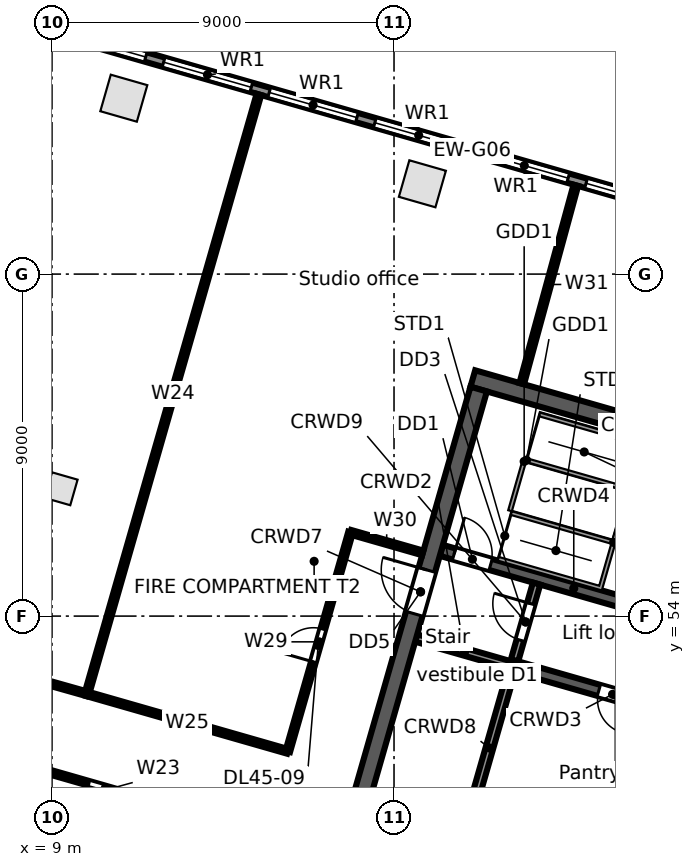
"""IFC4 building model, lengths in metres.
Left out: names, types, materials, properties, quantities, classifications, styles, units other than length and angle.
Written with IfcOpenShell. Run it as: python <this file> out.ifc"""

import sys

from ifc_helpers import new_model, si_unit, direction, frame, frame_2d, origin, origin_2d, place, context, subcontext, project, spatial, rectangle, extrude, element, fill, save


model = new_model("IFC4")
c1 = context("Model", 3, precision=1e-05, world=origin(), true_north=direction((0.0, 1.0)))
c2 = subcontext(c1, "Body", "Model", "MODEL_VIEW")
j1 = project(units=[si_unit("LENGTHUNIT", "METRE"), si_unit("PLANEANGLEUNIT", "RADIAN")], contexts=[c1])
p1 = place(None, origin())
s1 = spatial("IfcSite", under=j1, at=p1, CompositionType="ELEMENT")
p2 = place(p1, origin())
s2 = spatial("IfcBuilding", under=s1, at=p2, CompositionType="ELEMENT")
p3 = place(p2, frame((0.0, 0.0, 211.4)))
s3 = spatial("IfcBuildingStorey", under=s2, at=p3, CompositionType="ELEMENT", Elevation=211.4)
for number, where, z_axis, x_axis in (
    (1, (18.746, 65.376, 0.0), (0.0, 0.0, 1.0), (-0.961, 0.276, 0.0)),
    (2, (10.89, 67.629, 0.0), (0.0, 0.0, 1.0), (-0.961, 0.276, 0.0)),
):
    element("IfcColumn", number, at=place(p3, frame(where, z_axis=z_axis, x_axis=x_axis)), inside=s3, PredefinedType="COLUMN", context=c2, shape_type="SweptSolid", body=[
        extrude(rectangle(XDim=1.0, YDim=1.0, at=origin_2d()), origin(), (0.0, 0.0, 1.0), 3.9),
    ])
p4 = place(p3, frame((9.241, 57.35, 0.0), z_axis=(0.0, 0.0, 1.0), x_axis=(0.961261695938, -0.275637355817, 0.0)))
e3 = element("IfcColumn", 3, at=p4, inside=s3, PredefinedType="COLUMN", context=c2, shape_type="SweptSolid", body=[
    extrude(rectangle(XDim=0.7, YDim=0.7, at=origin_2d()), origin(), (0.0, 0.0, 1.0), 3.9),
])
p5 = place(p3, frame((3.34, 71.042, 0.0), z_axis=(0.0, 0.0, 1.0), x_axis=(0.96126179431, -0.275637012753, 0.0)))
e4 = element("IfcWall", 4, at=p5, inside=s3, PredefinedType="STANDARD", context=c2, shape_type="SweptSolid", body=[
    extrude(rectangle(XDim=34.779, YDim=0.25, at=frame_2d((17.39, 0.0))), origin(), (0.0, 0.0, 1.0), 3.62),
])
p6 = place(p5, frame((32.071, 0.0, 0.8)))
e5 = element("IfcOpeningElement", 5, at=p6, cuts=e4, PredefinedType="OPENING", context=c2, shape_type="SweptSolid", body=[
    extrude(rectangle(XDim=2.4, YDim=2.2, at=frame_2d((1.2, 1.1))), frame((0.0, 0.135, 0.0), z_axis=(0.0, -1.0, 0.0), x_axis=(1.0, 0.0, 0.0)), (0.0, 0.0, 1.0), 0.27),
])
p7 = place(p5, frame((29.18, 0.0, 0.8)))
e6 = element("IfcOpeningElement", 6, at=p7, cuts=e4, PredefinedType="OPENING", context=c2, shape_type="SweptSolid", body=[
    extrude(rectangle(XDim=2.4, YDim=2.2, at=frame_2d((1.2, 1.1))), frame((0.0, 0.135, 0.0), z_axis=(0.0, -1.0, 0.0), x_axis=(1.0, 0.0, 0.0)), (0.0, 0.0, 1.0), 0.27),
])
p8 = place(p5, frame((26.289, 0.0, 0.8)))
e7 = element("IfcOpeningElement", 7, at=p8, cuts=e4, PredefinedType="OPENING", context=c2, shape_type="SweptSolid", body=[
    extrude(rectangle(XDim=2.4, YDim=2.2, at=frame_2d((1.2, 1.1))), frame((0.0, 0.135, 0.0), z_axis=(0.0, -1.0, 0.0), x_axis=(1.0, 0.0, 0.0)), (0.0, 0.0, 1.0), 0.27),
])
p9 = place(p5, frame((23.398, 0.0, 0.8)))
e8 = element("IfcOpeningElement", 8, at=p9, cuts=e4, PredefinedType="OPENING", context=c2, shape_type="SweptSolid", body=[
    extrude(rectangle(XDim=2.4, YDim=2.2, at=frame_2d((1.2, 1.1))), frame((0.0, 0.135, 0.0), z_axis=(0.0, -1.0, 0.0), x_axis=(1.0, 0.0, 0.0)), (0.0, 0.0, 1.0), 0.27),
])
p10 = place(p5, frame((20.508, 0.0, 0.8)))
e9 = element("IfcOpeningElement", 9, at=p10, cuts=e4, PredefinedType="OPENING", context=c2, shape_type="SweptSolid", body=[
    extrude(rectangle(XDim=2.4, YDim=2.2, at=frame_2d((1.2, 1.1))), frame((0.0, 0.135, 0.0), z_axis=(0.0, -1.0, 0.0), x_axis=(1.0, 0.0, 0.0)), (0.0, 0.0, 1.0), 0.27),
])
p11 = place(p5, frame((17.616, 0.0, 0.8)))
e10 = element("IfcOpeningElement", 10, at=p11, cuts=e4, PredefinedType="OPENING", context=c2, shape_type="SweptSolid", body=[
    extrude(rectangle(XDim=2.4, YDim=2.2, at=frame_2d((1.2, 1.1))), frame((0.0, 0.135, 0.0), z_axis=(0.0, -1.0, 0.0), x_axis=(1.0, 0.0, 0.0)), (0.0, 0.0, 1.0), 0.27),
])
p12 = place(p5, frame((14.726, 0.0, 0.8)))
e11 = element("IfcOpeningElement", 11, at=p12, cuts=e4, PredefinedType="OPENING", context=c2, shape_type="SweptSolid", body=[
    extrude(rectangle(XDim=2.4, YDim=2.2, at=frame_2d((1.2, 1.1))), frame((0.0, 0.135, 0.0), z_axis=(0.0, -1.0, 0.0), x_axis=(1.0, 0.0, 0.0)), (0.0, 0.0, 1.0), 0.27),
])
p13 = place(p5, frame((11.834, 0.0, 0.8)))
e12 = element("IfcOpeningElement", 12, at=p13, cuts=e4, PredefinedType="OPENING", context=c2, shape_type="SweptSolid", body=[
    extrude(rectangle(XDim=2.4, YDim=2.2, at=frame_2d((1.2, 1.1))), frame((0.0, 0.135, 0.0), z_axis=(0.0, -1.0, 0.0), x_axis=(1.0, 0.0, 0.0)), (0.0, 0.0, 1.0), 0.27),
])
p14 = place(p5, frame((8.944, 0.0, 0.8)))
e13 = element("IfcOpeningElement", 13, at=p14, cuts=e4, PredefinedType="OPENING", context=c2, shape_type="SweptSolid", body=[
    extrude(rectangle(XDim=2.4, YDim=2.2, at=frame_2d((1.2, 1.1))), frame((0.0, 0.135, 0.0), z_axis=(0.0, -1.0, 0.0), x_axis=(1.0, 0.0, 0.0)), (0.0, 0.0, 1.0), 0.27),
])
p15 = place(p5, frame((6.052, 0.0, 0.8)))
e14 = element("IfcOpeningElement", 14, at=p15, cuts=e4, PredefinedType="OPENING", context=c2, shape_type="SweptSolid", body=[
    extrude(rectangle(XDim=2.4, YDim=2.2, at=frame_2d((1.2, 1.1))), frame((0.0, 0.135, 0.0), z_axis=(0.0, -1.0, 0.0), x_axis=(1.0, 0.0, 0.0)), (0.0, 0.0, 1.0), 0.27),
])
p16 = place(p5, frame((3.162, 0.0, 0.8)))
e15 = element("IfcOpeningElement", 15, at=p16, cuts=e4, PredefinedType="OPENING", context=c2, shape_type="SweptSolid", body=[
    extrude(rectangle(XDim=2.4, YDim=2.2, at=frame_2d((1.2, 1.1))), frame((0.0, 0.135, 0.0), z_axis=(0.0, -1.0, 0.0), x_axis=(1.0, 0.0, 0.0)), (0.0, 0.0, 1.0), 0.27),
])
p17 = place(p5, frame((0.271, 0.0, 0.8)))
e16 = element("IfcOpeningElement", 16, at=p17, cuts=e4, PredefinedType="OPENING", context=c2, shape_type="SweptSolid", body=[
    extrude(rectangle(XDim=2.4, YDim=2.2, at=frame_2d((1.2, 1.1))), frame((0.0, 0.135, 0.0), z_axis=(0.0, -1.0, 0.0), x_axis=(1.0, 0.0, 0.0)), (0.0, 0.0, 1.0), 0.27),
])
p18 = place(p3, frame((18.583, 53.423, 0.0), z_axis=(0.0, 0.0, 1.0), x_axis=(0.961259287968, -0.275645753268, 0.0)))
e17 = element("IfcWall", 17, at=p18, inside=s3, PredefinedType="SOLIDWALL", context=c2, shape_type="SweptSolid", body=[
    extrude(rectangle(XDim=2.65, YDim=0.2, at=frame_2d((1.325, 0.0))), origin(), (0.0, 0.0, 1.0), 3.62),
])
p19 = place(p3, frame((21.131, 52.692, 0.0), z_axis=(0.0, 0.0, 1.0), x_axis=(0.961261488075, -0.275638080722, 0.0)))
e18 = element("IfcWall", 18, at=p19, inside=s3, PredefinedType="SOLIDWALL", context=c2, shape_type="SweptSolid", body=[
    extrude(rectangle(XDim=5.45, YDim=0.3, at=frame_2d((2.725, 0.0))), origin(), (0.0, 0.0, 1.0), 3.62),
])
p20 = place(p19, frame((2.35, 0.0, 0.0)))
e19 = element("IfcOpeningElement", 19, at=p20, cuts=e18, PredefinedType="OPENING", context=c2, shape_type="SweptSolid", body=[
    extrude(rectangle(XDim=0.9, YDim=2.1, at=frame_2d((0.45, 1.05))), frame((0.0, 0.16, 0.0), z_axis=(0.0, -1.0, 0.0), x_axis=(1.0, 0.0, 0.0)), (0.0, 0.0, 1.0), 0.32),
])
p21 = place(p3, frame((19.245, 55.73, 0.0), z_axis=(0.0, 0.0, 1.0), x_axis=(0.961263007877, -0.275632780503, 0.0)))
e20 = element("IfcWall", 20, at=p21, inside=s3, PredefinedType="SOLIDWALL", context=c2, shape_type="SweptSolid", body=[
    extrude(rectangle(XDim=7.25, YDim=0.3, at=frame_2d((3.625, 0.0))), origin(), (0.0, 0.0, 1.0), 3.62),
])
p22 = place(p21, frame((0.35, 0.0, 0.0)))
e21 = element("IfcOpeningElement", 21, at=p22, cuts=e20, PredefinedType="OPENING", context=c2, shape_type="SweptSolid", body=[
    extrude(rectangle(XDim=1.0, YDim=2.1, at=frame_2d((0.5, 1.05))), frame((0.0, 0.16, 0.0), z_axis=(0.0, -1.0, 0.0), x_axis=(1.0, 0.0, 0.0)), (0.0, 0.0, 1.0), 0.32),
])
p23 = place(p3, frame((20.073, 60.252, 0.0), z_axis=(0.0, 0.0, 1.0), x_axis=(0.96126248289, -0.275634611374, 0.0)))
e22 = element("IfcWall", 22, at=p23, inside=s3, PredefinedType="SOLIDWALL", context=c2, shape_type="SweptSolid", body=[
    extrude(rectangle(XDim=9.0, YDim=0.45, at=frame_2d((4.5, 0.0))), origin(), (0.0, 0.0, 1.0), 3.62),
])
p24 = place(p3, frame((17.168, 49.303, 0.0), z_axis=(0.0, 0.0, 1.0), x_axis=(0.275638974822, 0.961261231695, 0.0)))
e23 = element("IfcWall", 23, at=p24, inside=s3, PredefinedType="SOLIDWALL", context=c2, shape_type="SweptSolid", body=[
    extrude(rectangle(XDim=11.1, YDim=0.45, at=frame_2d((5.55, 0.0))), origin(), (0.0, 0.0, 1.0), 3.62),
])
p25 = place(p24, frame((4.95, 0.0, 0.0)))
e24 = element("IfcOpeningElement", 24, at=p25, cuts=e23, PredefinedType="OPENING", context=c2, shape_type="SweptSolid", body=[
    extrude(rectangle(XDim=1.2, YDim=2.1, at=frame_2d((0.6, 1.05))), frame((0.0, 0.235, 0.0), z_axis=(0.0, -1.0, 0.0), x_axis=(1.0, 0.0, 0.0)), (0.0, 0.0, 1.0), 0.47),
])
p26 = place(p3, frame((19.932, 48.511, 0.0), z_axis=(0.0, 0.0, 1.0), x_axis=(0.275642273411, 0.961260285827, 0.0)))
e25 = element("IfcWall", 25, at=p26, inside=s3, PredefinedType="SOLIDWALL", context=c2, shape_type="SweptSolid", body=[
    extrude(rectangle(XDim=4.2, YDim=0.2, at=frame_2d((2.1, 0.0))), origin(), (0.0, 0.0, 1.0), 3.62),
])
p27 = place(p3, frame((21.172, 52.837, 0.0), z_axis=(0.0, 0.0, 1.0), x_axis=(0.275657676022, 0.961255868981, 0.0)))
e26 = element("IfcWall", 26, at=p27, inside=s3, PredefinedType="PARTITIONING", context=c2, shape_type="SweptSolid", body=[
    extrude(rectangle(XDim=2.1, YDim=0.2, at=frame_2d((1.05, 0.0))), origin(), (0.0, 0.0, 1.0), 3.62),
])
p28 = place(p27, frame((0.55, 0.0, 0.0)))
e27 = element("IfcOpeningElement", 27, at=p28, cuts=e26, PredefinedType="OPENING", context=c2, shape_type="SweptSolid", body=[
    extrude(rectangle(XDim=1.0, YDim=2.1, at=frame_2d((0.5, 1.05))), frame((0.0, 0.11, 0.0), z_axis=(0.0, -1.0, 0.0), x_axis=(1.0, 0.0, 0.0)), (0.0, 0.0, 1.0), 0.22),
])
p29 = place(p3, frame((0.0, 54.75, 0.0), z_axis=(0.0, 0.0, 1.0), x_axis=(0.962504897093, -0.271264304823, 0.0)))
e28 = element("IfcWall", 28, at=p29, inside=s3, PredefinedType="PARTITIONING", context=c2, shape_type="SweptSolid", body=[
    extrude(rectangle(XDim=10.303, YDim=0.125, at=frame_2d((5.152, 0.0))), origin(), (0.0, 0.0, 1.0), 2.9),
])
p30 = place(p29, frame((4.7, 0.0, 0.0)))
e29 = element("IfcOpeningElement", 29, at=p30, cuts=e28, PredefinedType="OPENING", context=c2, shape_type="SweptSolid", body=[
    extrude(rectangle(XDim=0.9, YDim=2.1, at=frame_2d((0.45, 1.05))), frame((0.0, 0.073, 0.0), z_axis=(0.0, -1.0, 0.0), x_axis=(1.0, 0.0, 0.0)), (0.0, 0.0, 1.0), 0.145),
])
p31 = place(p3, frame((6.413, 50.619, 0.0), z_axis=(0.0, 0.0, 1.0), x_axis=(0.961251402136, -0.275673252041, 0.0)))
e30 = element("IfcWall", 30, at=p31, inside=s3, PredefinedType="PARTITIONING", context=c2, shape_type="SweptSolid", body=[
    extrude(rectangle(XDim=8.499, YDim=0.125, at=frame_2d((4.25, 0.0))), origin(), (0.0, 0.0, 1.0), 2.8),
])
p32 = place(p31, frame((3.7, 0.0, 0.0)))
e31 = element("IfcOpeningElement", 31, at=p32, cuts=e30, PredefinedType="OPENING", context=c2, shape_type="SweptSolid", body=[
    extrude(rectangle(XDim=0.9, YDim=2.1, at=frame_2d((0.45, 1.05))), frame((0.0, 0.073, 0.0), z_axis=(0.0, -1.0, 0.0), x_axis=(1.0, 0.0, 0.0)), (0.0, 0.0, 1.0), 0.145),
])
p33 = place(p3, frame((9.917, 51.955, 0.0), z_axis=(0.0, 0.0, 1.0), x_axis=(0.275933286704, 0.96117678982, 0.0)))
e32 = element("IfcWall", 32, at=p33, inside=s3, PredefinedType="PARTITIONING", context=c2, shape_type="SweptSolid", body=[
    extrude(rectangle(XDim=16.41, YDim=0.125, at=frame_2d((8.205, 0.0))), origin(), (0.0, 0.0, 1.0), 2.792),
])
p34 = place(p3, frame((9.917, 51.955, 0.0), z_axis=(0.0, 0.0, 1.0), x_axis=(0.961258850611, -0.275647278458, 0.0)))
e33 = element("IfcWall", 33, at=p34, inside=s3, PredefinedType="PARTITIONING", context=c2, shape_type="SweptSolid", body=[
    extrude(rectangle(XDim=5.5, YDim=0.125, at=frame_2d((2.75, 0.0))), origin(), (0.0, 0.0, 1.0), 2.8),
])
p35 = place(p3, frame((15.204, 50.439, 0.0), z_axis=(0.0, 0.0, 1.0), x_axis=(0.275505760599, 0.961299420512, 0.0)))
e34 = element("IfcWall", 34, at=p35, inside=s3, PredefinedType="PARTITIONING", context=c2, shape_type="SweptSolid", body=[
    extrude(rectangle(XDim=5.999, YDim=0.125, at=frame_2d((3.0, 0.0))), origin(), (0.0, 0.0, 1.0), 2.8),
])
p36 = place(p35, frame((2.45, 0.0, 0.0)))
e35 = element("IfcOpeningElement", 35, at=p36, cuts=e34, PredefinedType="OPENING", context=c2, shape_type="SweptSolid", body=[
    extrude(rectangle(XDim=0.9, YDim=2.1, at=frame_2d((0.45, 1.05))), frame((0.0, 0.073, 0.0), z_axis=(0.0, -1.0, 0.0), x_axis=(1.0, 0.0, 0.0)), (0.0, 0.0, 1.0), 0.145),
])
p37 = place(p3, frame((16.857, 56.206, 0.0), z_axis=(0.0, 0.0, 1.0), x_axis=(0.961383985066, -0.275210525341, 0.0)))
e36 = element("IfcWall", 36, at=p37, inside=s3, PredefinedType="PARTITIONING", context=c2, shape_type="SweptSolid", body=[
    extrude(rectangle(XDim=1.977, YDim=0.125, at=frame_2d((0.988, 0.0))), origin(), (0.0, 0.0, 1.0), 3.62),
])
p38 = place(p3, frame((21.36, 60.117, 0.0), z_axis=(0.0, 0.0, 1.0), x_axis=(0.263151767798, 0.964754449124, 0.0)))
e37 = element("IfcWall", 37, at=p38, inside=s3, PredefinedType="PARTITIONING", context=c2, shape_type="SweptSolid", body=[
    extrude(rectangle(XDim=5.411, YDim=0.125, at=frame_2d((2.705, 0.0))), origin(), (0.0, 0.0, 1.0), 3.0),
])
p39 = place(p10, origin())
e38 = element("IfcWindow", 38, at=p39, inside=s3, PartitioningType="SINGLE_PANEL", PredefinedType="WINDOW", context=c2, shape_type="SweptSolid", body=[
    extrude(rectangle(XDim=2.4, YDim=2.2, at=frame_2d((1.2, 1.1))), frame((0.0, 0.03, 0.0), z_axis=(0.0, -1.0, 0.0), x_axis=(1.0, 0.0, 0.0)), (0.0, 0.0, 1.0), 0.06),
])
fill(e9, e38)
p40 = place(p11, origin())
e39 = element("IfcWindow", 39, at=p40, inside=s3, PartitioningType="SINGLE_PANEL", PredefinedType="WINDOW", context=c2, shape_type="SweptSolid", body=[
    extrude(rectangle(XDim=2.4, YDim=2.2, at=frame_2d((1.2, 1.1))), frame((0.0, 0.03, 0.0), z_axis=(0.0, -1.0, 0.0), x_axis=(1.0, 0.0, 0.0)), (0.0, 0.0, 1.0), 0.06),
])
fill(e10, e39)
p41 = place(p12, origin())
e40 = element("IfcWindow", 40, at=p41, inside=s3, PartitioningType="SINGLE_PANEL", PredefinedType="WINDOW", context=c2, shape_type="SweptSolid", body=[
    extrude(rectangle(XDim=2.4, YDim=2.2, at=frame_2d((1.2, 1.1))), frame((0.0, 0.03, 0.0), z_axis=(0.0, -1.0, 0.0), x_axis=(1.0, 0.0, 0.0)), (0.0, 0.0, 1.0), 0.06),
])
fill(e11, e40)
p42 = place(p13, origin())
e41 = element("IfcWindow", 41, at=p42, inside=s3, PartitioningType="SINGLE_PANEL", PredefinedType="WINDOW", context=c2, shape_type="SweptSolid", body=[
    extrude(rectangle(XDim=2.4, YDim=2.2, at=frame_2d((1.2, 1.1))), frame((0.0, 0.03, 0.0), z_axis=(0.0, -1.0, 0.0), x_axis=(1.0, 0.0, 0.0)), (0.0, 0.0, 1.0), 0.06),
])
fill(e12, e41)
p43 = place(p14, origin())
e42 = element("IfcWindow", 42, at=p43, inside=s3, PartitioningType="SINGLE_PANEL", PredefinedType="WINDOW", context=c2, shape_type="SweptSolid", body=[
    extrude(rectangle(XDim=2.4, YDim=2.2, at=frame_2d((1.2, 1.1))), frame((0.0, 0.03, 0.0), z_axis=(0.0, -1.0, 0.0), x_axis=(1.0, 0.0, 0.0)), (0.0, 0.0, 1.0), 0.06),
])
fill(e13, e42)
p44 = place(p15, origin())
e43 = element("IfcWindow", 43, at=p44, inside=s3, PartitioningType="SINGLE_PANEL", PredefinedType="WINDOW", context=c2, shape_type="SweptSolid", body=[
    extrude(rectangle(XDim=2.4, YDim=2.2, at=frame_2d((1.2, 1.1))), frame((0.0, 0.03, 0.0), z_axis=(0.0, -1.0, 0.0), x_axis=(1.0, 0.0, 0.0)), (0.0, 0.0, 1.0), 0.06),
])
fill(e14, e43)
p45 = place(p22, origin())
e44 = element("IfcDoor", 44, at=p45, inside=s3, OperationType="SINGLE_SWING_LEFT", PredefinedType="DOOR", context=c2, shape_type="SweptSolid", body=[
    extrude(rectangle(XDim=1.0, YDim=2.1, at=frame_2d((0.5, 1.05))), frame((0.0, 0.025, 0.0), z_axis=(0.0, -1.0, 0.0), x_axis=(1.0, 0.0, 0.0)), (0.0, 0.0, 1.0), 0.05),
])
fill(e21, e44)
p46 = place(p28, origin())
e45 = element("IfcDoor", 45, at=p46, inside=s3, OperationType="SINGLE_SWING_RIGHT", PredefinedType="DOOR", context=c2, shape_type="SweptSolid", body=[
    extrude(rectangle(XDim=1.0, YDim=2.1, at=frame_2d((0.5, 1.05))), frame((0.0, 0.025, 0.0), z_axis=(0.0, -1.0, 0.0), x_axis=(1.0, 0.0, 0.0)), (0.0, 0.0, 1.0), 0.05),
])
fill(e27, e45)
p47 = place(p25, origin())
e46 = element("IfcDoor", 46, at=p47, inside=s3, OperationType="SINGLE_SWING_RIGHT", PredefinedType="DOOR", context=c2, shape_type="SweptSolid", body=[
    extrude(rectangle(XDim=1.2, YDim=2.1, at=frame_2d((0.6, 1.05))), frame((0.0, 0.025, 0.0), z_axis=(0.0, -1.0, 0.0), x_axis=(1.0, 0.0, 0.0)), (0.0, 0.0, 1.0), 0.05),
])
fill(e24, e46)
p48 = place(p20, frame((0.9, 0.0, 0.0), z_axis=(0.0, 0.0, 1.0), x_axis=(-1.0, 0.0, 0.0)))
e47 = element("IfcDoor", 47, at=p48, inside=s3, OperationType="SINGLE_SWING_LEFT", PredefinedType="DOOR", context=c2, shape_type="SweptSolid", body=[
    extrude(rectangle(XDim=0.9, YDim=2.1, at=frame_2d((0.45, 1.05))), frame((0.0, 0.025, 0.0), z_axis=(0.0, -1.0, 0.0), x_axis=(1.0, 0.0, 0.0)), (0.0, 0.0, 1.0), 0.05),
])
fill(e19, e47)
p49 = place(p36, origin())
e48 = element("IfcDoor", 48, at=p49, inside=s3, OperationType="SINGLE_SWING_LEFT", PredefinedType="DOOR", context=c2, shape_type="SweptSolid", body=[
    extrude(rectangle(XDim=0.9, YDim=2.1, at=frame_2d((0.45, 1.05))), frame((0.0, 0.025, 0.0), z_axis=(0.0, -1.0, 0.0), x_axis=(1.0, 0.0, 0.0)), (0.0, 0.0, 1.0), 0.05),
])
fill(e35, e48)
p50 = place(p32, frame((0.9, 0.0, 0.0), z_axis=(0.0, 0.0, 1.0), x_axis=(-1.0, 0.0, 0.0)))
e49 = element("IfcDoor", 49, at=p50, inside=s3, OperationType="SINGLE_SWING_RIGHT", PredefinedType="DOOR", context=c2, shape_type="SweptSolid", body=[
    extrude(rectangle(XDim=0.9, YDim=2.1, at=frame_2d((0.45, 1.05))), frame((0.0, 0.025, 0.0), z_axis=(0.0, -1.0, 0.0), x_axis=(1.0, 0.0, 0.0)), (0.0, 0.0, 1.0), 0.05),
])
fill(e31, e49)
save(model, sys.argv[1])
